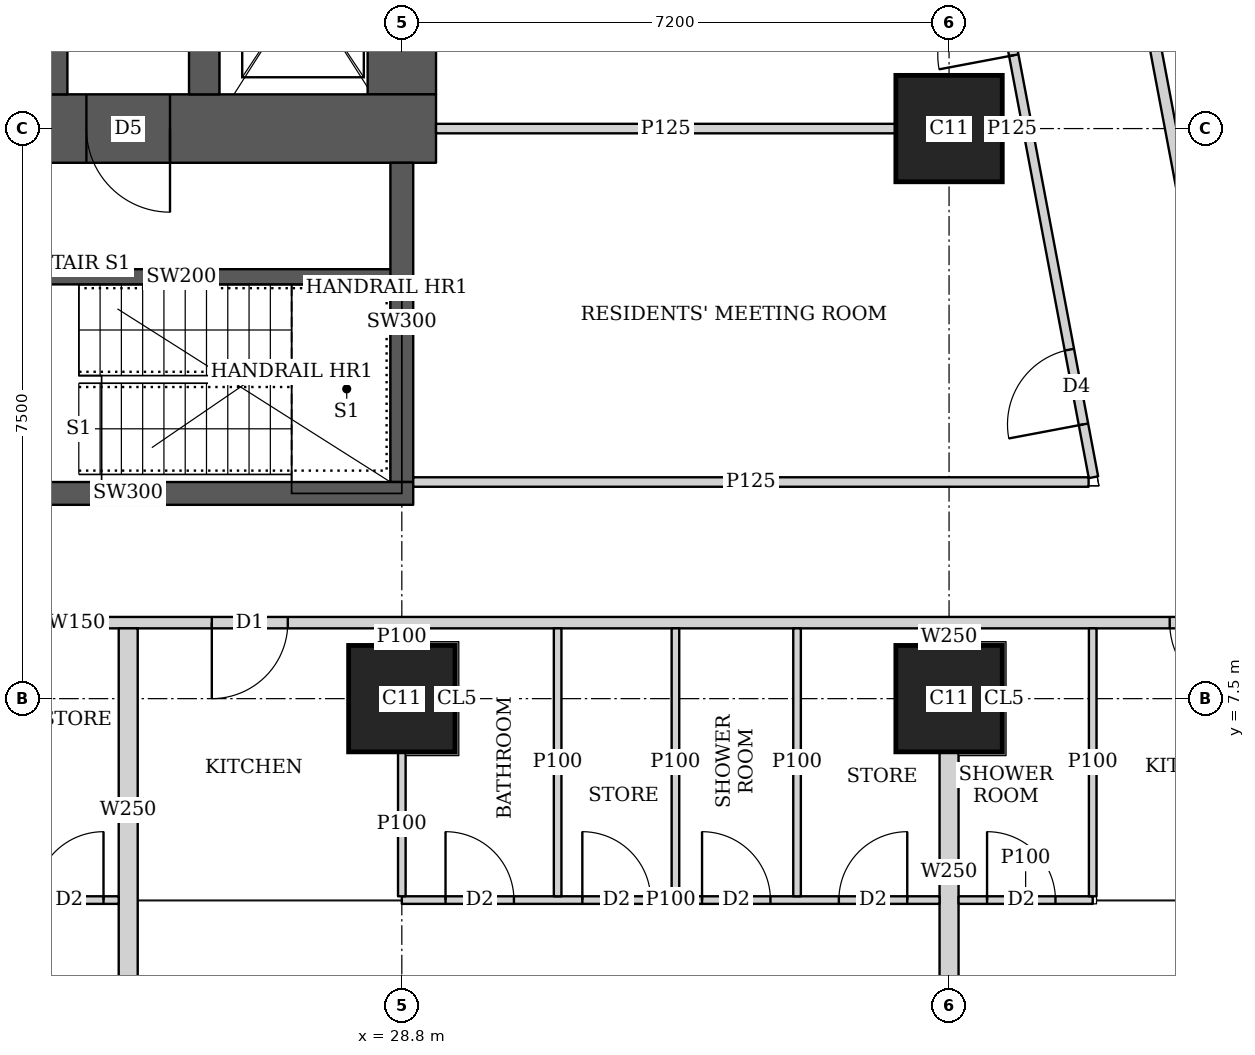
"""IFC4 building model, lengths in metres.
Left out: names, types, materials, properties, quantities, classifications, styles, units other than length and angle.
Written with IfcOpenShell. Run it as: python <this file> out.ifc"""

import sys

from ifc_helpers import new_model, si_unit, direction, frame, frame_2d, origin, origin_2d, place, context, subcontext, project, spatial, rectangle, extrude, element, fill, save


model = new_model("IFC4")
c1 = context("Model", 3, precision=1e-05, world=origin(), true_north=direction((0.0, 1.0)))
c2 = subcontext(c1, "Body", "Model", "MODEL_VIEW")
j1 = project(units=[si_unit("LENGTHUNIT", "METRE"), si_unit("PLANEANGLEUNIT", "RADIAN")], contexts=[c1])
p1 = place(None, origin())
s1 = spatial("IfcSite", under=j1, at=p1, CompositionType="ELEMENT")
p2 = place(p1, origin())
s2 = spatial("IfcBuilding", under=s1, at=p2, CompositionType="ELEMENT")
p3 = place(p2, frame((0.0, 0.0, 208.7)))
s3 = spatial("IfcBuildingStorey", under=s2, at=p3, CompositionType="ELEMENT", Elevation=208.7)
for number, where, z_axis, x_axis in (
    (1, (28.8, 7.5, 0.0), (0.0, 0.0, 1.0), (1.0, 0.0, 0.0)),
    (2, (36.0, 7.5, 0.0), (0.0, 0.0, 1.0), (1.0, 0.0, 0.0)),
    (3, (36.0, 15.0, 0.0), (0.0, 0.0, 1.0), (1.0, 0.0, 0.0)),
):
    element("IfcColumn", number, at=place(p3, frame(where, z_axis=z_axis, x_axis=x_axis)), inside=s3, PredefinedType="COLUMN", context=c2, shape_type="SweptSolid", body=[
        extrude(rectangle(XDim=1.4, YDim=1.4, at=origin_2d()), origin(), (0.0, 0.0, 1.0), 3.75),
    ])
p4 = place(p3, frame((13.95, 15.0, 0.0), z_axis=(0.0, 0.0, 1.0), x_axis=(1.0, 0.0, 0.0)))
e4 = element("IfcWall", 4, at=p4, inside=s3, PredefinedType="SHEAR", context=c2, shape_type="SweptSolid", body=[
    extrude(rectangle(XDim=15.3, YDim=0.9, at=frame_2d((7.65, 0.0))), origin(), (0.0, 0.0, 1.0), 3.75),
])
p5 = place(p4, frame((4.45, 0.0, 0.0)))
e5 = element("IfcOpeningElement", 5, at=p5, cuts=e4, PredefinedType="OPENING", context=c2, shape_type="SweptSolid", body=[
    extrude(rectangle(XDim=1.8, YDim=2.1, at=frame_2d((0.9, 1.05))), frame((0.0, 0.46, 0.0), z_axis=(0.0, -1.0, 0.0), x_axis=(1.0, 0.0, 0.0)), (0.0, 0.0, 1.0), 0.92),
])
p6 = place(p4, frame((10.7, 0.0, 0.0)))
e6 = element("IfcOpeningElement", 6, at=p6, cuts=e4, PredefinedType="OPENING", context=c2, shape_type="SweptSolid", body=[
    extrude(rectangle(XDim=1.1, YDim=2.1, at=frame_2d((0.55, 1.05))), frame((0.0, 0.46, 0.0), z_axis=(0.0, -1.0, 0.0), x_axis=(1.0, 0.0, 0.0)), (0.0, 0.0, 1.0), 0.92),
])
p7 = place(p3, frame((28.8, 15.45, 0.0), z_axis=(0.0, 0.0, 1.0), x_axis=(0.0, 1.0, 0.0)))
e7 = element("IfcWall", 7, at=p7, inside=s3, PredefinedType="SHEAR", context=c2, shape_type="SweptSolid", body=[
    extrude(rectangle(XDim=14.1, YDim=0.9, at=frame_2d((7.05, 0.0))), origin(), (0.0, 0.0, 1.0), 3.75),
])
p8 = place(p3, frame((24.2, 15.45, 0.0), z_axis=(0.0, 0.0, 1.0), x_axis=(0.0, 1.0, 0.0)))
e8 = element("IfcWall", 8, at=p8, inside=s3, PredefinedType="SHEAR", context=c2, shape_type="SweptSolid", body=[
    extrude(rectangle(XDim=14.1, YDim=0.4, at=frame_2d((7.05, 0.0))), origin(), (0.0, 0.0, 1.0), 3.75),
])
p9 = place(p3, frame((26.2, 15.45, 0.0), z_axis=(0.0, 0.0, 1.0), x_axis=(0.0, 1.0, 0.0)))
e9 = element("IfcWall", 9, at=p9, inside=s3, PredefinedType="SHEAR", context=c2, shape_type="SweptSolid", body=[
    extrude(rectangle(XDim=3.1, YDim=0.4, at=frame_2d((1.55, 0.0))), origin(), (0.0, 0.0, 1.0), 3.75),
])
p10 = place(p9, frame((0.825, 0.0, 0.0)))
e10 = element("IfcOpeningElement", 10, at=p10, cuts=e9, PredefinedType="OPENING", context=c2, shape_type="SweptSolid", body=[
    extrude(rectangle(XDim=1.2, YDim=2.1, at=frame_2d((0.6, 1.05))), frame((0.0, 0.21, 0.0), z_axis=(0.0, -1.0, 0.0), x_axis=(1.0, 0.0, 0.0)), (0.0, 0.0, 1.0), 0.42),
])
p11 = place(p3, frame((21.45, 10.2, 0.0), z_axis=(0.0, 0.0, 1.0), x_axis=(1.0, 0.0, 0.0)))
e11 = element("IfcWall", 11, at=p11, inside=s3, PredefinedType="SHEAR", context=c2, shape_type="SweptSolid", body=[
    extrude(rectangle(XDim=7.5, YDim=0.3, at=frame_2d((3.75, 0.0))), origin(), (0.0, 0.0, 1.0), 3.75),
])
p12 = place(p11, frame((0.5, 0.0, 0.0)))
e12 = element("IfcOpeningElement", 12, at=p12, cuts=e11, PredefinedType="OPENING", context=c2, shape_type="SweptSolid", body=[
    extrude(rectangle(XDim=1.1, YDim=2.1, at=frame_2d((0.55, 1.05))), frame((0.0, 0.16, 0.0), z_axis=(0.0, -1.0, 0.0), x_axis=(1.0, 0.0, 0.0)), (0.0, 0.0, 1.0), 0.32),
])
p13 = place(p3, frame((28.8, 10.35, 0.0), z_axis=(0.0, 0.0, 1.0), x_axis=(0.0, 1.0, 0.0)))
e13 = element("IfcWall", 13, at=p13, inside=s3, PredefinedType="SHEAR", context=c2, shape_type="SweptSolid", body=[
    extrude(rectangle(XDim=4.2, YDim=0.3, at=frame_2d((2.1, 0.0))), origin(), (0.0, 0.0, 1.0), 3.75),
])
p14 = place(p3, frame((40.053, 8.5, 0.0), z_axis=(0.0, 0.0, 1.0), x_axis=(-1.0, 0.0, 0.0)))
e14 = element("IfcWall", 14, at=p14, inside=s3, PredefinedType="SOLIDWALL", context=c2, shape_type="SweptSolid", body=[
    extrude(rectangle(XDim=31.052, YDim=0.15, at=frame_2d((15.526, 0.0))), origin(), (0.0, 0.0, 1.0), 3.5),
])
p15 = place(p14, frame((29.178, 0.0, 0.0)))
e15 = element("IfcOpeningElement", 15, at=p15, cuts=e14, PredefinedType="OPENING", context=c2, shape_type="SweptSolid", body=[
    extrude(rectangle(XDim=1.0, YDim=2.1, at=frame_2d((0.5, 1.05))), frame((0.0, 0.085, 0.0), z_axis=(0.0, -1.0, 0.0), x_axis=(1.0, 0.0, 0.0)), (0.0, 0.0, 1.0), 0.17),
])
p16 = place(p14, frame((19.953, 0.0, 0.0)))
e16 = element("IfcOpeningElement", 16, at=p16, cuts=e14, PredefinedType="OPENING", context=c2, shape_type="SweptSolid", body=[
    extrude(rectangle(XDim=1.0, YDim=2.1, at=frame_2d((0.5, 1.05))), frame((0.0, 0.085, 0.0), z_axis=(0.0, -1.0, 0.0), x_axis=(1.0, 0.0, 0.0)), (0.0, 0.0, 1.0), 0.17),
])
p17 = place(p14, frame((12.753, 0.0, 0.0)))
e17 = element("IfcOpeningElement", 17, at=p17, cuts=e14, PredefinedType="OPENING", context=c2, shape_type="SweptSolid", body=[
    extrude(rectangle(XDim=1.0, YDim=2.1, at=frame_2d((0.5, 1.05))), frame((0.0, 0.085, 0.0), z_axis=(0.0, -1.0, 0.0), x_axis=(1.0, 0.0, 0.0)), (0.0, 0.0, 1.0), 0.17),
])
p18 = place(p14, frame((0.15, 0.0, 0.0)))
e18 = element("IfcOpeningElement", 18, at=p18, cuts=e14, PredefinedType="OPENING", context=c2, shape_type="SweptSolid", body=[
    extrude(rectangle(XDim=1.0, YDim=2.1, at=frame_2d((0.5, 1.05))), frame((0.0, 0.085, 0.0), z_axis=(0.0, -1.0, 0.0), x_axis=(1.0, 0.0, 0.0)), (0.0, 0.0, 1.0), 0.17),
])
p19 = place(p3, frame((33.68, 42.723, 0.0), z_axis=(0.0, 0.0, 1.0), x_axis=(0.185601160014, -0.982625162207, 0.0)))
e19 = element("IfcWall", 19, at=p19, inside=s3, PredefinedType="SOLIDWALL", context=c2, shape_type="SweptSolid", body=[
    extrude(rectangle(XDim=41.051, YDim=0.15, at=frame_2d((20.526, 0.0))), origin(), (0.0, 0.0, 1.0), 2.5),
])
p20 = place(p19, frame((12.307, 0.0, 0.0)))
e20 = element("IfcOpeningElement", 20, at=p20, cuts=e19, PredefinedType="OPENING", context=c2, shape_type="SweptSolid", body=[
    extrude(rectangle(XDim=1.0, YDim=2.1, at=frame_2d((0.5, 1.05))), frame((0.0, 0.085, 0.0), z_axis=(0.0, -1.0, 0.0), x_axis=(1.0, 0.0, 0.0)), (0.0, 0.0, 1.0), 0.17),
])
p21 = place(p19, frame((16.123, 0.0, 0.0)))
e21 = element("IfcOpeningElement", 21, at=p21, cuts=e19, PredefinedType="OPENING", context=c2, shape_type="SweptSolid", body=[
    extrude(rectangle(XDim=1.0, YDim=2.1, at=frame_2d((0.5, 1.05))), frame((0.0, 0.085, 0.0), z_axis=(0.0, -1.0, 0.0), x_axis=(1.0, 0.0, 0.0)), (0.0, 0.0, 1.0), 0.17),
])
p22 = place(p19, frame((30.902, 0.0, 0.0)))
e22 = element("IfcOpeningElement", 22, at=p22, cuts=e19, PredefinedType="OPENING", context=c2, shape_type="SweptSolid", body=[
    extrude(rectangle(XDim=1.0, YDim=2.1, at=frame_2d((0.5, 1.05))), frame((0.0, 0.085, 0.0), z_axis=(0.0, -1.0, 0.0), x_axis=(1.0, 0.0, 0.0)), (0.0, 0.0, 1.0), 0.17),
])
p23 = place(p3, frame((25.075, 4.85, 0.0), z_axis=(0.0, 0.0, 1.0), x_axis=(-1.0, 0.0, 0.0)))
e23 = element("IfcWall", 23, at=p23, inside=s3, PredefinedType="PARTITIONING", context=c2, shape_type="SweptSolid", body=[
    extrude(rectangle(XDim=3.475, YDim=0.1, at=frame_2d((1.737, 0.0))), origin(), (0.0, 0.0, 1.0), 3.5),
])
p24 = place(p23, frame((2.0, 0.0, 0.0)))
e24 = element("IfcOpeningElement", 24, at=p24, cuts=e23, PredefinedType="OPENING", context=c2, shape_type="SweptSolid", body=[
    extrude(rectangle(XDim=0.9, YDim=2.1, at=frame_2d((0.45, 1.05))), frame((0.0, 0.06, 0.0), z_axis=(0.0, -1.0, 0.0), x_axis=(1.0, 0.0, 0.0)), (0.0, 0.0, 1.0), 0.12),
])
p25 = place(p23, frame((0.2, 0.0, 0.0)))
e25 = element("IfcOpeningElement", 25, at=p25, cuts=e23, PredefinedType="OPENING", context=c2, shape_type="SweptSolid", body=[
    extrude(rectangle(XDim=0.9, YDim=2.1, at=frame_2d((0.45, 1.05))), frame((0.0, 0.06, 0.0), z_axis=(0.0, -1.0, 0.0), x_axis=(1.0, 0.0, 0.0)), (0.0, 0.0, 1.0), 0.12),
])
p26 = place(p3, frame((35.875, 4.85, 0.0), z_axis=(0.0, 0.0, 1.0), x_axis=(-1.0, 0.0, 0.0)))
e26 = element("IfcWall", 26, at=p26, inside=s3, PredefinedType="PARTITIONING", context=c2, shape_type="SweptSolid", body=[
    extrude(rectangle(XDim=7.075, YDim=0.1, at=frame_2d((3.538, 0.0))), origin(), (0.0, 0.0, 1.0), 3.5),
])
p27 = place(p26, frame((5.6, 0.0, 0.0)))
e27 = element("IfcOpeningElement", 27, at=p27, cuts=e26, PredefinedType="OPENING", context=c2, shape_type="SweptSolid", body=[
    extrude(rectangle(XDim=0.9, YDim=2.1, at=frame_2d((0.45, 1.05))), frame((0.0, 0.06, 0.0), z_axis=(0.0, -1.0, 0.0), x_axis=(1.0, 0.0, 0.0)), (0.0, 0.0, 1.0), 0.12),
])
p28 = place(p26, frame((2.225, 0.0, 0.0)))
e28 = element("IfcOpeningElement", 28, at=p28, cuts=e26, PredefinedType="OPENING", context=c2, shape_type="SweptSolid", body=[
    extrude(rectangle(XDim=0.9, YDim=2.1, at=frame_2d((0.45, 1.05))), frame((0.0, 0.06, 0.0), z_axis=(0.0, -1.0, 0.0), x_axis=(1.0, 0.0, 0.0)), (0.0, 0.0, 1.0), 0.12),
])
p29 = place(p26, frame((3.8, 0.0, 0.0)))
e29 = element("IfcOpeningElement", 29, at=p29, cuts=e26, PredefinedType="OPENING", context=c2, shape_type="SweptSolid", body=[
    extrude(rectangle(XDim=0.9, YDim=2.1, at=frame_2d((0.45, 1.05))), frame((0.0, 0.06, 0.0), z_axis=(0.0, -1.0, 0.0), x_axis=(1.0, 0.0, 0.0)), (0.0, 0.0, 1.0), 0.12),
])
p30 = place(p26, frame((0.425, 0.0, 0.0)))
e30 = element("IfcOpeningElement", 30, at=p30, cuts=e26, PredefinedType="OPENING", context=c2, shape_type="SweptSolid", body=[
    extrude(rectangle(XDim=0.9, YDim=2.1, at=frame_2d((0.45, 1.05))), frame((0.0, 0.06, 0.0), z_axis=(0.0, -1.0, 0.0), x_axis=(1.0, 0.0, 0.0)), (0.0, 0.0, 1.0), 0.12),
])
p31 = place(p3, frame((28.8, 4.9, 0.0), z_axis=(0.0, 0.0, 1.0), x_axis=(0.0, 1.0, 0.0)))
e31 = element("IfcWall", 31, at=p31, inside=s3, PredefinedType="PARTITIONING", context=c2, shape_type="SweptSolid", body=[
    extrude(rectangle(XDim=1.899, YDim=0.1, at=frame_2d((0.95, 0.0))), origin(), (0.0, 0.0, 1.0), 3.5),
])
p32 = place(p3, frame((28.8, 8.201, 0.0), z_axis=(0.0, 0.0, 1.0), x_axis=(0.0, 1.0, 0.0)))
e32 = element("IfcWall", 32, at=p32, inside=s3, PredefinedType="PARTITIONING", context=c2, shape_type="SweptSolid", body=[
    extrude(rectangle(XDim=0.224, YDim=0.1, at=frame_2d((0.112, 0.0))), origin(), (0.0, 0.0, 1.0), 3.5),
])
for number, where, z_axis, x_axis in (
    (33, (32.4, 4.9, 0.0), (0.0, 0.0, 1.0), (0.0, 1.0, 0.0)),
    (34, (30.85, 4.9, 0.0), (0.0, 0.0, 1.0), (0.0, 1.0, 0.0)),
    (35, (34.0, 4.9, 0.0), (0.0, 0.0, 1.0), (0.0, 1.0, 0.0)),
):
    element("IfcWall", number, at=place(p3, frame(where, z_axis=z_axis, x_axis=x_axis)), inside=s3, PredefinedType="PARTITIONING", context=c2, shape_type="SweptSolid", body=[
        extrude(rectangle(XDim=3.525, YDim=0.1, at=frame_2d((1.763, 0.0))), origin(), (0.0, 0.0, 1.0), 3.5),
    ])
p33 = place(p3, frame((25.2, 3.65, 0.0), z_axis=(0.0, 0.0, 1.0), x_axis=(0.0, 1.0, 0.0)))
e36 = element("IfcWall", 36, at=p33, inside=s3, PredefinedType="SOLIDWALL", context=c2, shape_type="SweptSolid", body=[
    extrude(rectangle(XDim=4.775, YDim=0.25, at=frame_2d((2.388, 0.0))), origin(), (0.0, 0.0, 1.0), 3.5),
])
p34 = place(p3, frame((37.89, 4.85, 0.0), z_axis=(0.0, 0.0, 1.0), x_axis=(-1.0, 0.0, 0.0)))
e37 = element("IfcWall", 37, at=p34, inside=s3, PredefinedType="PARTITIONING", context=c2, shape_type="SweptSolid", body=[
    extrude(rectangle(XDim=1.765, YDim=0.1, at=frame_2d((0.882, 0.0))), origin(), (0.0, 0.0, 1.0), 3.5),
])
p35 = place(p34, frame((0.49, 0.0, 0.0)))
e38 = element("IfcOpeningElement", 38, at=p35, cuts=e37, PredefinedType="OPENING", context=c2, shape_type="SweptSolid", body=[
    extrude(rectangle(XDim=0.9, YDim=2.1, at=frame_2d((0.45, 1.05))), frame((0.0, 0.06, 0.0), z_axis=(0.0, -1.0, 0.0), x_axis=(1.0, 0.0, 0.0)), (0.0, 0.0, 1.0), 0.12),
])
p36 = place(p3, frame((37.89, 4.9, 0.0), z_axis=(0.0, 0.0, 1.0), x_axis=(0.0, 1.0, 0.0)))
e39 = element("IfcWall", 39, at=p36, inside=s3, PredefinedType="PARTITIONING", context=c2, shape_type="SweptSolid", body=[
    extrude(rectangle(XDim=3.525, YDim=0.1, at=frame_2d((1.763, 0.0))), origin(), (0.0, 0.0, 1.0), 3.5),
])
p37 = place(p3, frame((36.0, 3.65, 0.0), z_axis=(0.0, 0.0, 1.0), x_axis=(0.0, 1.0, 0.0)))
e40 = element("IfcWall", 40, at=p37, inside=s3, PredefinedType="SOLIDWALL", context=c2, shape_type="SweptSolid", body=[
    extrude(rectangle(XDim=3.149, YDim=0.25, at=frame_2d((1.575, 0.0))), origin(), (0.0, 0.0, 1.0), 3.5),
])
p38 = place(p3, frame((36.0, 8.201, 0.0), z_axis=(0.0, 0.0, 1.0), x_axis=(0.0, 1.0, 0.0)))
e41 = element("IfcWall", 41, at=p38, inside=s3, PredefinedType="SOLIDWALL", context=c2, shape_type="SweptSolid", body=[
    extrude(rectangle(XDim=0.224, YDim=0.25, at=frame_2d((0.112, 0.0))), origin(), (0.0, 0.0, 1.0), 3.5),
])
p39 = place(p3, frame((28.95, 10.35, 0.0), z_axis=(0.0, 0.0, 1.0), x_axis=(1.0, 0.0, 0.0)))
e42 = element("IfcWall", 42, at=p39, inside=s3, PredefinedType="PARTITIONING", context=c2, shape_type="SweptSolid", body=[
    extrude(rectangle(XDim=8.886, YDim=0.125, at=frame_2d((4.443, 0.0))), origin(), (0.0, 0.0, 1.0), 3.5),
])
p40 = place(p3, frame((37.9, 10.413, 0.0), z_axis=(0.0, 0.0, 1.0), x_axis=(-0.185589740669, 0.982627319058, 0.0)))
e43 = element("IfcWall", 43, at=p40, inside=s3, PredefinedType="PARTITIONING", context=c2, shape_type="SweptSolid", body=[
    extrude(rectangle(XDim=24.602, YDim=0.125, at=frame_2d((12.301, 0.0))), origin(), (0.0, 0.0, 1.0), 2.5),
])
p41 = place(p40, frame((0.708, 0.0, 0.0)))
e44 = element("IfcOpeningElement", 44, at=p41, cuts=e43, PredefinedType="OPENING", context=c2, shape_type="SweptSolid", body=[
    extrude(rectangle(XDim=1.0, YDim=2.1, at=frame_2d((0.5, 1.05))), frame((0.0, 0.073, 0.0), z_axis=(0.0, -1.0, 0.0), x_axis=(1.0, 0.0, 0.0)), (0.0, 0.0, 1.0), 0.145),
])
p42 = place(p40, frame((5.65, 0.0, 0.0)))
e45 = element("IfcOpeningElement", 45, at=p42, cuts=e43, PredefinedType="OPENING", context=c2, shape_type="SweptSolid", body=[
    extrude(rectangle(XDim=1.0, YDim=2.1, at=frame_2d((0.5, 1.05))), frame((0.0, 0.073, 0.0), z_axis=(0.0, -1.0, 0.0), x_axis=(1.0, 0.0, 0.0)), (0.0, 0.0, 1.0), 0.145),
])
p43 = place(p40, frame((13.124, 0.0, 0.0)))
e46 = element("IfcOpeningElement", 46, at=p43, cuts=e43, PredefinedType="OPENING", context=c2, shape_type="SweptSolid", body=[
    extrude(rectangle(XDim=1.0, YDim=2.1, at=frame_2d((0.5, 1.05))), frame((0.0, 0.073, 0.0), z_axis=(0.0, -1.0, 0.0), x_axis=(1.0, 0.0, 0.0)), (0.0, 0.0, 1.0), 0.145),
])
p44 = place(p40, frame((16.94, 0.0, 0.0)))
e47 = element("IfcOpeningElement", 47, at=p44, cuts=e43, PredefinedType="OPENING", context=c2, shape_type="SweptSolid", body=[
    extrude(rectangle(XDim=1.0, YDim=2.1, at=frame_2d((0.5, 1.05))), frame((0.0, 0.073, 0.0), z_axis=(0.0, -1.0, 0.0), x_axis=(1.0, 0.0, 0.0)), (0.0, 0.0, 1.0), 0.145),
])
p45 = place(p40, frame((20.9, 0.0, 0.0)))
e48 = element("IfcOpeningElement", 48, at=p45, cuts=e43, PredefinedType="OPENING", context=c2, shape_type="SweptSolid", body=[
    extrude(rectangle(XDim=1.0, YDim=2.1, at=frame_2d((0.5, 1.05))), frame((0.0, 0.073, 0.0), z_axis=(0.0, -1.0, 0.0), x_axis=(1.0, 0.0, 0.0)), (0.0, 0.0, 1.0), 0.145),
])
p46 = place(p3, frame((29.25, 15.0, 0.0), z_axis=(0.0, 0.0, 1.0), x_axis=(1.0, 0.0, 0.0)))
e49 = element("IfcWall", 49, at=p46, inside=s3, PredefinedType="PARTITIONING", context=c2, shape_type="SweptSolid", body=[
    extrude(rectangle(XDim=6.049, YDim=0.125, at=frame_2d((3.024, 0.0))), origin(), (0.0, 0.0, 1.0), 3.5),
])
p47 = place(p3, frame((36.701, 15.0, 0.0), z_axis=(0.0, 0.0, 1.0), x_axis=(1.0, 0.0, 0.0)))
e50 = element("IfcWall", 50, at=p47, inside=s3, PredefinedType="PARTITIONING", context=c2, shape_type="SweptSolid", body=[
    extrude(rectangle(XDim=0.257, YDim=0.125, at=frame_2d((0.128, 0.0))), origin(), (0.0, 0.0, 1.0), 3.5),
])
p48 = place(p3, frame((23.0, 13.05, 0.0), z_axis=(0.0, 0.0, 1.0), x_axis=(1.0, 0.0, 0.0)))
e51 = element("IfcWall", 51, at=p48, inside=s3, PredefinedType="SHEAR", context=c2, shape_type="SweptSolid", body=[
    extrude(rectangle(XDim=5.8, YDim=0.2, at=frame_2d((2.9, 0.0))), origin(), (0.0, 0.0, 1.0), 3.75),
])
p49 = place(p25, origin())
e52 = element("IfcDoor", 52, at=p49, inside=s3, OperationType="SINGLE_SWING_RIGHT", PredefinedType="DOOR", context=c2, shape_type="SweptSolid", body=[
    extrude(rectangle(XDim=0.9, YDim=2.1, at=frame_2d((0.45, 1.05))), frame((0.0, 0.025, 0.0), z_axis=(0.0, -1.0, 0.0), x_axis=(1.0, 0.0, 0.0)), (0.0, 0.0, 1.0), 0.05),
])
fill(e25, e52)
p50 = place(p27, origin())
e53 = element("IfcDoor", 53, at=p50, inside=s3, OperationType="SINGLE_SWING_LEFT", PredefinedType="DOOR", context=c2, shape_type="SweptSolid", body=[
    extrude(rectangle(XDim=0.9, YDim=2.1, at=frame_2d((0.45, 1.05))), frame((0.0, 0.025, 0.0), z_axis=(0.0, -1.0, 0.0), x_axis=(1.0, 0.0, 0.0)), (0.0, 0.0, 1.0), 0.05),
])
fill(e27, e53)
p51 = place(p28, origin())
e54 = element("IfcDoor", 54, at=p51, inside=s3, OperationType="SINGLE_SWING_LEFT", PredefinedType="DOOR", context=c2, shape_type="SweptSolid", body=[
    extrude(rectangle(XDim=0.9, YDim=2.1, at=frame_2d((0.45, 1.05))), frame((0.0, 0.025, 0.0), z_axis=(0.0, -1.0, 0.0), x_axis=(1.0, 0.0, 0.0)), (0.0, 0.0, 1.0), 0.05),
])
fill(e28, e54)
p52 = place(p29, origin())
e55 = element("IfcDoor", 55, at=p52, inside=s3, OperationType="SINGLE_SWING_LEFT", PredefinedType="DOOR", context=c2, shape_type="SweptSolid", body=[
    extrude(rectangle(XDim=0.9, YDim=2.1, at=frame_2d((0.45, 1.05))), frame((0.0, 0.025, 0.0), z_axis=(0.0, -1.0, 0.0), x_axis=(1.0, 0.0, 0.0)), (0.0, 0.0, 1.0), 0.05),
])
fill(e29, e55)
p53 = place(p30, origin())
e56 = element("IfcDoor", 56, at=p53, inside=s3, OperationType="SINGLE_SWING_RIGHT", PredefinedType="DOOR", context=c2, shape_type="SweptSolid", body=[
    extrude(rectangle(XDim=0.9, YDim=2.1, at=frame_2d((0.45, 1.05))), frame((0.0, 0.025, 0.0), z_axis=(0.0, -1.0, 0.0), x_axis=(1.0, 0.0, 0.0)), (0.0, 0.0, 1.0), 0.05),
])
fill(e30, e56)
p54 = place(p17, origin())
e57 = element("IfcDoor", 57, at=p54, inside=s3, OperationType="SINGLE_SWING_RIGHT", PredefinedType="DOOR", context=c2, shape_type="SweptSolid", body=[
    extrude(rectangle(XDim=1.0, YDim=2.1, at=frame_2d((0.5, 1.05))), frame((0.0, 0.025, 0.0), z_axis=(0.0, -1.0, 0.0), x_axis=(1.0, 0.0, 0.0)), (0.0, 0.0, 1.0), 0.05),
])
fill(e17, e57)
p55 = place(p35, origin())
e58 = element("IfcDoor", 58, at=p55, inside=s3, OperationType="SINGLE_SWING_LEFT", PredefinedType="DOOR", context=c2, shape_type="SweptSolid", body=[
    extrude(rectangle(XDim=0.9, YDim=2.1, at=frame_2d((0.45, 1.05))), frame((0.0, 0.025, 0.0), z_axis=(0.0, -1.0, 0.0), x_axis=(1.0, 0.0, 0.0)), (0.0, 0.0, 1.0), 0.05),
])
fill(e38, e58)
p56 = place(p18, origin())
e59 = element("IfcDoor", 59, at=p56, inside=s3, OperationType="SINGLE_SWING_LEFT", PredefinedType="DOOR", context=c2, shape_type="SweptSolid", body=[
    extrude(rectangle(XDim=1.0, YDim=2.1, at=frame_2d((0.5, 1.05))), frame((0.0, 0.025, 0.0), z_axis=(0.0, -1.0, 0.0), x_axis=(1.0, 0.0, 0.0)), (0.0, 0.0, 1.0), 0.05),
])
fill(e18, e59)
p57 = place(p41, origin())
e60 = element("IfcDoor", 60, at=p57, inside=s3, OperationType="SINGLE_SWING_LEFT", PredefinedType="DOOR", context=c2, shape_type="SweptSolid", body=[
    extrude(rectangle(XDim=1.0, YDim=2.1, at=frame_2d((0.5, 1.05))), frame((0.0, 0.025, 0.0), z_axis=(0.0, -1.0, 0.0), x_axis=(1.0, 0.0, 0.0)), (0.0, 0.0, 1.0), 0.05),
])
fill(e44, e60)
p58 = place(p42, origin())
e61 = element("IfcDoor", 61, at=p58, inside=s3, OperationType="SINGLE_SWING_LEFT", PredefinedType="DOOR", context=c2, shape_type="SweptSolid", body=[
    extrude(rectangle(XDim=1.0, YDim=2.1, at=frame_2d((0.5, 1.05))), frame((0.0, 0.025, 0.0), z_axis=(0.0, -1.0, 0.0), x_axis=(1.0, 0.0, 0.0)), (0.0, 0.0, 1.0), 0.05),
])
fill(e45, e61)
p59 = place(p6, origin())
e62 = element("IfcDoor", 62, at=p59, inside=s3, OperationType="SINGLE_SWING_LEFT", PredefinedType="DOOR", context=c2, shape_type="SweptSolid", body=[
    extrude(rectangle(XDim=1.1, YDim=2.1, at=frame_2d((0.55, 1.05))), frame((0.0, 0.025, 0.0), z_axis=(0.0, -1.0, 0.0), x_axis=(1.0, 0.0, 0.0)), (0.0, 0.0, 1.0), 0.05),
])
fill(e6, e62)
save(model, sys.argv[1])
